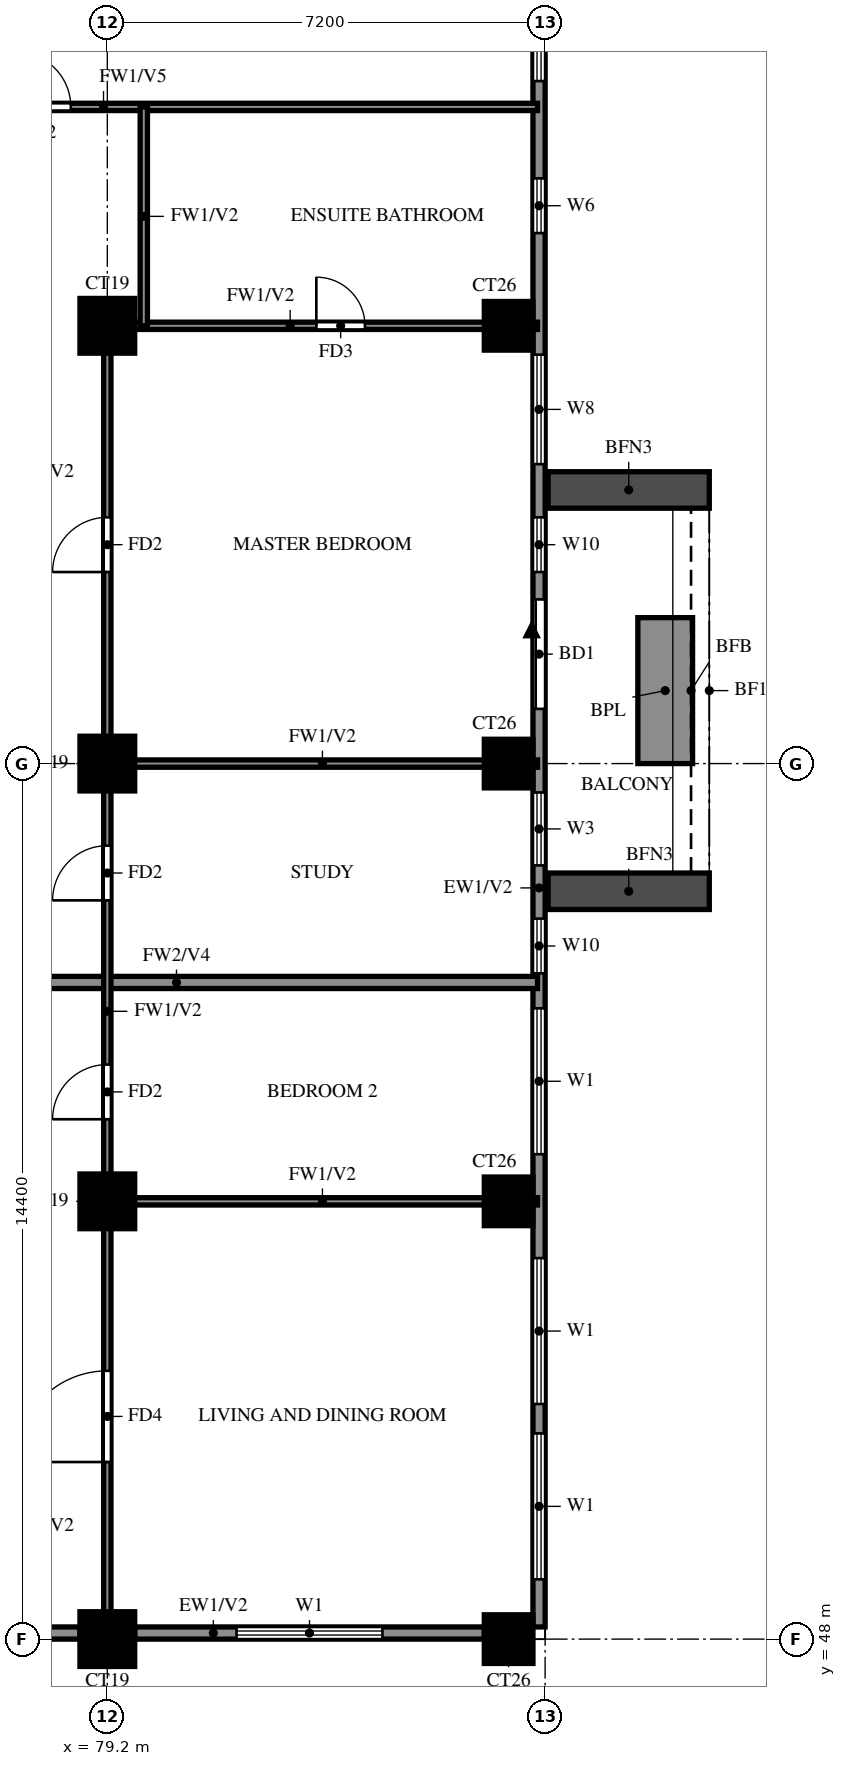
"""IFC4 building model, lengths in metres.
Left out: names, types, materials, properties, quantities, classifications, styles, units other than length and angle.
Written with IfcOpenShell. Run it as: python <this file> out.ifc"""

import sys

from ifc_helpers import new_model, si_unit, direction, frame, frame_2d, origin, origin_2d, place, context, subcontext, project, spatial, rectangle, extrude, source, transform, mapped, element, fill, save


model = new_model("IFC4")
c1 = context("Model", 3, precision=1e-05, world=origin(), true_north=direction((0.0, 1.0)))
c2 = subcontext(c1, "Body", "Model", "MODEL_VIEW")
j1 = project(units=[si_unit("LENGTHUNIT", "METRE"), si_unit("PLANEANGLEUNIT", "RADIAN")], contexts=[c1])
p1 = place(None, origin())
s1 = spatial("IfcSite", under=j1, at=p1, CompositionType="ELEMENT")
p2 = place(p1, origin())
s2 = spatial("IfcBuilding", under=s1, at=p2, CompositionType="ELEMENT")
p3 = place(p2, frame((0.0, 0.0, 174.5)))
s3 = spatial("IfcBuildingStorey", under=s2, at=p3, CompositionType="ELEMENT", Elevation=174.5)
m1 = source(origin(), c2, "Body", "SweptSolid", [
    extrude(rectangle(XDim=0.9, YDim=0.9, at=origin_2d()), origin(), (0.0, 0.0, 1.0), 3.2),
])
p4 = place(p3, frame((79.2, 48.0, 0.0), z_axis=(0.0, 0.0, 1.0), x_axis=(1.0, 0.0, 0.0)))
e1 = element("IfcColumn", 1, at=p4, inside=s3, PredefinedType="COLUMN", context=c2, shape_type="MappedRepresentation", body=[
    mapped(m1, transform((0.0, 0.0, 0.0))),
])
m2 = source(origin(), c2, "Body", "SweptSolid", [
    extrude(rectangle(XDim=0.8, YDim=0.8, at=origin_2d()), origin(), (0.0, 0.0, 1.0), 3.2),
])
p5 = place(p3, frame((85.8, 48.0, 0.0), z_axis=(0.0, 0.0, 1.0), x_axis=(1.0, 0.0, 0.0)))
e2 = element("IfcColumn", 2, at=p5, inside=s3, PredefinedType="COLUMN", context=c2, shape_type="MappedRepresentation", body=[
    mapped(m2, transform((0.0, 0.0, 0.0))),
])
p6 = place(p3, frame((79.2, 55.2, 0.0), z_axis=(0.0, 0.0, 1.0), x_axis=(1.0, 0.0, 0.0)))
e3 = element("IfcColumn", 3, at=p6, inside=s3, PredefinedType="COLUMN", context=c2, shape_type="MappedRepresentation", body=[
    mapped(m1, transform((0.0, 0.0, 0.0))),
])
p7 = place(p3, frame((85.8, 55.2, 0.0), z_axis=(0.0, 0.0, 1.0), x_axis=(1.0, 0.0, 0.0)))
e4 = element("IfcColumn", 4, at=p7, inside=s3, PredefinedType="COLUMN", context=c2, shape_type="MappedRepresentation", body=[
    mapped(m2, transform((0.0, 0.0, 0.0))),
])
p8 = place(p3, frame((79.2, 62.4, 0.0), z_axis=(0.0, 0.0, 1.0), x_axis=(1.0, 0.0, 0.0)))
e5 = element("IfcColumn", 5, at=p8, inside=s3, PredefinedType="COLUMN", context=c2, shape_type="MappedRepresentation", body=[
    mapped(m1, transform((0.0, 0.0, 0.0))),
])
p9 = place(p3, frame((85.8, 62.4, 0.0), z_axis=(0.0, 0.0, 1.0), x_axis=(1.0, 0.0, 0.0)))
e6 = element("IfcColumn", 6, at=p9, inside=s3, PredefinedType="COLUMN", context=c2, shape_type="MappedRepresentation", body=[
    mapped(m2, transform((0.0, 0.0, 0.0))),
])
p10 = place(p3, frame((79.2, 69.6, 0.0), z_axis=(0.0, 0.0, 1.0), x_axis=(1.0, 0.0, 0.0)))
e7 = element("IfcColumn", 7, at=p10, inside=s3, PredefinedType="COLUMN", context=c2, shape_type="MappedRepresentation", body=[
    mapped(m1, transform((0.0, 0.0, 0.0))),
])
p11 = place(p3, frame((85.8, 69.6, 0.0), z_axis=(0.0, 0.0, 1.0), x_axis=(1.0, 0.0, 0.0)))
e8 = element("IfcColumn", 8, at=p11, inside=s3, PredefinedType="COLUMN", context=c2, shape_type="MappedRepresentation", body=[
    mapped(m2, transform((0.0, 0.0, 0.0))),
])
p12 = place(p3, frame((85.719, 39.881, 0.0), z_axis=(0.0, 0.0, 1.0), x_axis=(-0.86377618652, 0.503875678716, 0.0)))
e9 = element("IfcWall", 9, at=p12, inside=s3, PredefinedType="SOLIDWALL", context=c2, shape_type="SweptSolid", body=[
    extrude(rectangle(XDim=16.311, YDim=0.2, at=frame_2d((8.156, 0.0))), origin(), (0.0, 0.0, 1.0), 3.2),
])
p13 = place(p12, frame((13.326, 0.0, 1.5)))
e10 = element("IfcOpeningElement", 10, at=p13, cuts=e9, PredefinedType="OPENING", context=c2, shape_type="SweptSolid", body=[
    extrude(rectangle(XDim=0.9, YDim=0.9, at=frame_2d((0.45, 0.45))), frame((0.0, 0.11, 0.0), z_axis=(0.0, -1.0, 0.0), x_axis=(1.0, 0.0, 0.0)), (0.0, 0.0, 1.0), 0.22),
])
p14 = place(p3, frame((71.99, 48.1, 0.0), z_axis=(0.0, 0.0, 1.0), x_axis=(1.0, 0.0, 0.0)))
e11 = element("IfcWall", 11, at=p14, inside=s3, PredefinedType="SOLIDWALL", context=c2, shape_type="SweptSolid", body=[
    extrude(rectangle(XDim=6.76, YDim=0.2, at=frame_2d((3.38, 0.0))), origin(), (0.0, 0.0, 1.0), 3.2),
])
p15 = place(p14, frame((2.205, 0.0, 1.5)))
e12 = element("IfcOpeningElement", 12, at=p15, cuts=e11, PredefinedType="OPENING", context=c2, shape_type="SweptSolid", body=[
    extrude(rectangle(XDim=0.9, YDim=0.9, at=frame_2d((0.45, 0.45))), frame((0.0, 0.11, 0.0), z_axis=(0.0, -1.0, 0.0), x_axis=(1.0, 0.0, 0.0)), (0.0, 0.0, 1.0), 0.22),
])
p16 = place(p3, frame((79.65, 48.1, 0.0), z_axis=(0.0, 0.0, 1.0), x_axis=(1.0, 0.0, 0.0)))
e13 = element("IfcWall", 13, at=p16, inside=s3, PredefinedType="SOLIDWALL", context=c2, shape_type="SweptSolid", body=[
    extrude(rectangle(XDim=5.75, YDim=0.2, at=frame_2d((2.875, 0.0))), origin(), (0.0, 0.0, 1.0), 3.2),
])
p17 = place(p16, frame((1.675, 0.0, 0.6)))
e14 = element("IfcOpeningElement", 14, at=p17, cuts=e13, PredefinedType="OPENING", context=c2, shape_type="SweptSolid", body=[
    extrude(rectangle(XDim=2.4, YDim=2.4, at=frame_2d((1.2, 1.2))), frame((0.0, 0.11, 0.0), z_axis=(0.0, -1.0, 0.0), x_axis=(1.0, 0.0, 0.0)), (0.0, 0.0, 1.0), 0.22),
])
p18 = place(p3, frame((86.3, 48.2, 0.0), z_axis=(0.0, 0.0, 1.0), x_axis=(0.0, 1.0, 0.0)))
e15 = element("IfcWall", 15, at=p18, inside=s3, PredefinedType="SOLIDWALL", context=c2, shape_type="SweptSolid", body=[
    extrude(rectangle(XDim=28.6, YDim=0.2, at=frame_2d((14.3, 0.0))), origin(), (0.0, 0.0, 1.0), 3.2),
])
p19 = place(p18, frame((15.1, 0.0, 0.0)))
e16 = element("IfcOpeningElement", 16, at=p19, cuts=e15, PredefinedType="OPENING", context=c2, shape_type="SweptSolid", body=[
    extrude(rectangle(XDim=1.8, YDim=2.4, at=frame_2d((0.9, 1.2))), frame((0.0, 0.11, 0.0), z_axis=(0.0, -1.0, 0.0), x_axis=(1.0, 0.0, 0.0)), (0.0, 0.0, 1.0), 0.22),
])
p20 = place(p18, frame((0.783, 0.0, 0.6)))
e17 = element("IfcOpeningElement", 17, at=p20, cuts=e15, PredefinedType="OPENING", context=c2, shape_type="SweptSolid", body=[
    extrude(rectangle(XDim=2.4, YDim=2.4, at=frame_2d((1.2, 1.2))), frame((0.0, 0.11, 0.0), z_axis=(0.0, -1.0, 0.0), x_axis=(1.0, 0.0, 0.0)), (0.0, 0.0, 1.0), 0.22),
])
p21 = place(p18, frame((3.667, 0.0, 0.6)))
e18 = element("IfcOpeningElement", 18, at=p21, cuts=e15, PredefinedType="OPENING", context=c2, shape_type="SweptSolid", body=[
    extrude(rectangle(XDim=2.4, YDim=2.4, at=frame_2d((1.2, 1.2))), frame((0.0, 0.11, 0.0), z_axis=(0.0, -1.0, 0.0), x_axis=(1.0, 0.0, 0.0)), (0.0, 0.0, 1.0), 0.22),
])
p22 = place(p18, frame((7.775, 0.0, 0.6)))
e19 = element("IfcOpeningElement", 19, at=p22, cuts=e15, PredefinedType="OPENING", context=c2, shape_type="SweptSolid", body=[
    extrude(rectangle(XDim=2.4, YDim=2.4, at=frame_2d((1.2, 1.2))), frame((0.0, 0.11, 0.0), z_axis=(0.0, -1.0, 0.0), x_axis=(1.0, 0.0, 0.0)), (0.0, 0.0, 1.0), 0.22),
])
p23 = place(p18, frame((10.75, 0.0, 0.6)))
e20 = element("IfcOpeningElement", 20, at=p23, cuts=e15, PredefinedType="OPENING", context=c2, shape_type="SweptSolid", body=[
    extrude(rectangle(XDim=0.9, YDim=2.4, at=frame_2d((0.45, 1.2))), frame((0.0, 0.11, 0.0), z_axis=(0.0, -1.0, 0.0), x_axis=(1.0, 0.0, 0.0)), (0.0, 0.0, 1.0), 0.22),
])
p24 = place(p18, frame((12.525, 0.0, 0.6)))
e21 = element("IfcOpeningElement", 21, at=p24, cuts=e15, PredefinedType="OPENING", context=c2, shape_type="SweptSolid", body=[
    extrude(rectangle(XDim=1.2, YDim=2.4, at=frame_2d((0.6, 1.2))), frame((0.0, 0.11, 0.0), z_axis=(0.0, -1.0, 0.0), x_axis=(1.0, 0.0, 0.0)), (0.0, 0.0, 1.0), 0.22),
])
p25 = place(p18, frame((17.35, 0.0, 0.6)))
e22 = element("IfcOpeningElement", 22, at=p25, cuts=e15, PredefinedType="OPENING", context=c2, shape_type="SweptSolid", body=[
    extrude(rectangle(XDim=0.9, YDim=2.4, at=frame_2d((0.45, 1.2))), frame((0.0, 0.11, 0.0), z_axis=(0.0, -1.0, 0.0), x_axis=(1.0, 0.0, 0.0)), (0.0, 0.0, 1.0), 0.22),
])
p26 = place(p18, frame((19.125, 0.0, 0.6)))
e23 = element("IfcOpeningElement", 23, at=p26, cuts=e15, PredefinedType="OPENING", context=c2, shape_type="SweptSolid", body=[
    extrude(rectangle(XDim=1.8, YDim=2.4, at=frame_2d((0.9, 1.2))), frame((0.0, 0.11, 0.0), z_axis=(0.0, -1.0, 0.0), x_axis=(1.0, 0.0, 0.0)), (0.0, 0.0, 1.0), 0.22),
])
p27 = place(p18, frame((22.925, 0.0, 1.5)))
e24 = element("IfcOpeningElement", 24, at=p27, cuts=e15, PredefinedType="OPENING", context=c2, shape_type="SweptSolid", body=[
    extrude(rectangle(XDim=0.9, YDim=0.9, at=frame_2d((0.45, 0.45))), frame((0.0, 0.11, 0.0), z_axis=(0.0, -1.0, 0.0), x_axis=(1.0, 0.0, 0.0)), (0.0, 0.0, 1.0), 0.22),
])
p28 = place(p18, frame((25.425, 0.0, 0.6)))
e25 = element("IfcOpeningElement", 25, at=p28, cuts=e15, PredefinedType="OPENING", context=c2, shape_type="SweptSolid", body=[
    extrude(rectangle(XDim=2.4, YDim=2.4, at=frame_2d((1.2, 1.2))), frame((0.0, 0.11, 0.0), z_axis=(0.0, -1.0, 0.0), x_axis=(1.0, 0.0, 0.0)), (0.0, 0.0, 1.0), 0.22),
])
for number, where, z_axis, x_axis in (
    (26, (86.45, 60.3, 0.0), (0.0, 0.0, 1.0), (1.0, 0.0, 0.0)),
    (27, (86.45, 66.9, 0.0), (0.0, 0.0, 1.0), (1.0, 0.0, 0.0)),
):
    element("IfcWall", number, at=place(p3, frame(where, z_axis=z_axis, x_axis=x_axis)), inside=s3, PredefinedType="SOLIDWALL", context=c2, shape_type="SweptSolid", body=[
        extrude(rectangle(XDim=2.65, YDim=0.6, at=frame_2d((1.325, 0.0))), origin(), (0.0, 0.0, 1.0), 2.85),
    ])
p29 = place(p3, frame((88.375, 62.4, 0.0), z_axis=(0.0, 0.0, 1.0), x_axis=(0.0, 1.0, 0.0)))
e28 = element("IfcWall", 28, at=p29, inside=s3, PredefinedType="SOLIDWALL", context=c2, shape_type="SweptSolid", body=[
    extrude(rectangle(XDim=2.4, YDim=0.9, at=frame_2d((1.2, 0.0))), origin(), (0.0, 0.0, 1.0), 0.9),
])
p30 = place(p3, frame((74.4, 58.8, 0.0), z_axis=(0.0, 0.0, 1.0), x_axis=(1.0, 0.0, 0.0)))
e29 = element("IfcWall", 29, at=p30, inside=s3, PredefinedType="SOLIDWALL", context=c2, shape_type="SweptSolid", body=[
    extrude(rectangle(XDim=11.875, YDim=0.2, at=frame_2d((5.938, 0.0))), origin(), (0.0, 0.0, 1.0), 2.3),
])
for number, where, z_axis, x_axis in (
    (30, (79.2, 55.2, 0.0), (0.0, 0.0, 1.0), (1.0, 0.0, 0.0)),
    (31, (79.2, 62.4, 0.0), (0.0, 0.0, 1.0), (1.0, 0.0, 0.0)),
):
    element("IfcWall", number, at=place(p3, frame(where, z_axis=z_axis, x_axis=x_axis)), inside=s3, PredefinedType="PARTITIONING", context=c2, shape_type="SweptSolid", body=[
        extrude(rectangle(XDim=7.075, YDim=0.12, at=frame_2d((3.538, 0.0))), origin(), (0.0, 0.0, 1.0), 3.2),
    ])
p31 = place(p3, frame((79.2, 69.6, 0.0), z_axis=(0.0, 0.0, 1.0), x_axis=(1.0, 0.0, 0.0)))
e32 = element("IfcWall", 32, at=p31, inside=s3, PredefinedType="PARTITIONING", context=c2, shape_type="SweptSolid", body=[
    extrude(rectangle(XDim=7.075, YDim=0.12, at=frame_2d((3.538, 0.0))), origin(), (0.0, 0.0, 1.0), 3.2),
])
p32 = place(p31, frame((3.438, 0.0, 0.0)))
e33 = element("IfcOpeningElement", 33, at=p32, cuts=e32, PredefinedType="OPENING", context=c2, shape_type="SweptSolid", body=[
    extrude(rectangle(XDim=0.8, YDim=2.1, at=frame_2d((0.4, 1.05))), frame((0.0, 0.07, 0.0), z_axis=(0.0, -1.0, 0.0), x_axis=(1.0, 0.0, 0.0)), (0.0, 0.0, 1.0), 0.14),
])
p33 = place(p3, frame((72.0, 73.2, 0.0), z_axis=(0.0, 0.0, 1.0), x_axis=(1.0, 0.0, 0.0)))
e34 = element("IfcWall", 34, at=p33, inside=s3, PredefinedType="PARTITIONING", context=c2, shape_type="SweptSolid", body=[
    extrude(rectangle(XDim=14.275, YDim=0.12, at=frame_2d((7.137, 0.0))), origin(), (0.0, 0.0, 1.0), 2.3),
])
p34 = place(p33, frame((5.7, 0.0, 0.0)))
e35 = element("IfcOpeningElement", 35, at=p34, cuts=e34, PredefinedType="OPENING", context=c2, shape_type="SweptSolid", body=[
    extrude(rectangle(XDim=0.9, YDim=2.1, at=frame_2d((0.45, 1.05))), frame((0.0, 0.07, 0.0), z_axis=(0.0, -1.0, 0.0), x_axis=(1.0, 0.0, 0.0)), (0.0, 0.0, 1.0), 0.14),
])
p35 = place(p3, frame((79.2, 48.125, 0.0), z_axis=(0.0, 0.0, 1.0), x_axis=(0.0, 1.0, 0.0)))
e36 = element("IfcWall", 36, at=p35, inside=s3, PredefinedType="PARTITIONING", context=c2, shape_type="SweptSolid", body=[
    extrude(rectangle(XDim=21.475, YDim=0.12, at=frame_2d((10.738, 0.0))), origin(), (0.0, 0.0, 1.0), 3.2),
])
p36 = place(p35, frame((2.788, 0.0, 0.0)))
e37 = element("IfcOpeningElement", 37, at=p36, cuts=e36, PredefinedType="OPENING", context=c2, shape_type="SweptSolid", body=[
    extrude(rectangle(XDim=1.5, YDim=2.1, at=frame_2d((0.75, 1.05))), frame((0.0, 0.07, 0.0), z_axis=(0.0, -1.0, 0.0), x_axis=(1.0, 0.0, 0.0)), (0.0, 0.0, 1.0), 0.14),
])
p37 = place(p35, frame((8.425, 0.0, 0.0)))
e38 = element("IfcOpeningElement", 38, at=p37, cuts=e36, PredefinedType="OPENING", context=c2, shape_type="SweptSolid", body=[
    extrude(rectangle(XDim=0.9, YDim=2.1, at=frame_2d((0.45, 1.05))), frame((0.0, 0.07, 0.0), z_axis=(0.0, -1.0, 0.0), x_axis=(1.0, 0.0, 0.0)), (0.0, 0.0, 1.0), 0.14),
])
p38 = place(p35, frame((12.025, 0.0, 0.0)))
e39 = element("IfcOpeningElement", 39, at=p38, cuts=e36, PredefinedType="OPENING", context=c2, shape_type="SweptSolid", body=[
    extrude(rectangle(XDim=0.9, YDim=2.1, at=frame_2d((0.45, 1.05))), frame((0.0, 0.07, 0.0), z_axis=(0.0, -1.0, 0.0), x_axis=(1.0, 0.0, 0.0)), (0.0, 0.0, 1.0), 0.14),
])
p39 = place(p35, frame((17.425, 0.0, 0.0)))
e40 = element("IfcOpeningElement", 40, at=p39, cuts=e36, PredefinedType="OPENING", context=c2, shape_type="SweptSolid", body=[
    extrude(rectangle(XDim=0.9, YDim=2.1, at=frame_2d((0.45, 1.05))), frame((0.0, 0.07, 0.0), z_axis=(0.0, -1.0, 0.0), x_axis=(1.0, 0.0, 0.0)), (0.0, 0.0, 1.0), 0.14),
])
p40 = place(p3, frame((79.8, 69.6, 0.0), z_axis=(0.0, 0.0, 1.0), x_axis=(0.0, 1.0, 0.0)))
e41 = element("IfcWall", 41, at=p40, inside=s3, PredefinedType="PARTITIONING", context=c2, shape_type="SweptSolid", body=[
    extrude(rectangle(XDim=3.6, YDim=0.12, at=frame_2d((1.8, 0.0))), origin(), (0.0, 0.0, 1.0), 3.2),
])
p41 = place(p17, origin())
e42 = element("IfcWindow", 42, at=p41, inside=s3, PartitioningType="DOUBLE_PANEL_VERTICAL", PredefinedType="WINDOW", context=c2, shape_type="SweptSolid", body=[
    extrude(rectangle(XDim=2.4, YDim=2.4, at=frame_2d((1.2, 1.2))), frame((0.0, 0.03, 0.0), z_axis=(0.0, -1.0, 0.0), x_axis=(1.0, 0.0, 0.0)), (0.0, 0.0, 1.0), 0.06),
])
fill(e14, e42)
p42 = place(p19, origin())
e43 = element("IfcDoor", 43, at=p42, inside=s3, OperationType="DOUBLE_DOOR_SLIDING", PredefinedType="DOOR", context=c2, shape_type="SweptSolid", body=[
    extrude(rectangle(XDim=1.8, YDim=2.4, at=frame_2d((0.9, 1.2))), frame((0.0, 0.025, 0.0), z_axis=(0.0, -1.0, 0.0), x_axis=(1.0, 0.0, 0.0)), (0.0, 0.0, 1.0), 0.05),
])
fill(e16, e43)
p43 = place(p20, origin())
e44 = element("IfcWindow", 44, at=p43, inside=s3, PartitioningType="DOUBLE_PANEL_VERTICAL", PredefinedType="WINDOW", context=c2, shape_type="SweptSolid", body=[
    extrude(rectangle(XDim=2.4, YDim=2.4, at=frame_2d((1.2, 1.2))), frame((0.0, 0.03, 0.0), z_axis=(0.0, -1.0, 0.0), x_axis=(1.0, 0.0, 0.0)), (0.0, 0.0, 1.0), 0.06),
])
fill(e17, e44)
p44 = place(p21, origin())
e45 = element("IfcWindow", 45, at=p44, inside=s3, PartitioningType="DOUBLE_PANEL_VERTICAL", PredefinedType="WINDOW", context=c2, shape_type="SweptSolid", body=[
    extrude(rectangle(XDim=2.4, YDim=2.4, at=frame_2d((1.2, 1.2))), frame((0.0, 0.03, 0.0), z_axis=(0.0, -1.0, 0.0), x_axis=(1.0, 0.0, 0.0)), (0.0, 0.0, 1.0), 0.06),
])
fill(e18, e45)
p45 = place(p22, origin())
e46 = element("IfcWindow", 46, at=p45, inside=s3, PartitioningType="DOUBLE_PANEL_VERTICAL", PredefinedType="WINDOW", context=c2, shape_type="SweptSolid", body=[
    extrude(rectangle(XDim=2.4, YDim=2.4, at=frame_2d((1.2, 1.2))), frame((0.0, 0.03, 0.0), z_axis=(0.0, -1.0, 0.0), x_axis=(1.0, 0.0, 0.0)), (0.0, 0.0, 1.0), 0.06),
])
fill(e19, e46)
p46 = place(p23, origin())
e47 = element("IfcWindow", 47, at=p46, inside=s3, PartitioningType="SINGLE_PANEL", PredefinedType="WINDOW", context=c2, shape_type="SweptSolid", body=[
    extrude(rectangle(XDim=0.9, YDim=2.4, at=frame_2d((0.45, 1.2))), frame((0.0, 0.03, 0.0), z_axis=(0.0, -1.0, 0.0), x_axis=(1.0, 0.0, 0.0)), (0.0, 0.0, 1.0), 0.06),
])
fill(e20, e47)
p47 = place(p24, origin())
e48 = element("IfcWindow", 48, at=p47, inside=s3, PartitioningType="SINGLE_PANEL", PredefinedType="WINDOW", context=c2, shape_type="SweptSolid", body=[
    extrude(rectangle(XDim=1.2, YDim=2.4, at=frame_2d((0.6, 1.2))), frame((0.0, 0.03, 0.0), z_axis=(0.0, -1.0, 0.0), x_axis=(1.0, 0.0, 0.0)), (0.0, 0.0, 1.0), 0.06),
])
fill(e21, e48)
p48 = place(p25, origin())
e49 = element("IfcWindow", 49, at=p48, inside=s3, PartitioningType="SINGLE_PANEL", PredefinedType="WINDOW", context=c2, shape_type="SweptSolid", body=[
    extrude(rectangle(XDim=0.9, YDim=2.4, at=frame_2d((0.45, 1.2))), frame((0.0, 0.03, 0.0), z_axis=(0.0, -1.0, 0.0), x_axis=(1.0, 0.0, 0.0)), (0.0, 0.0, 1.0), 0.06),
])
fill(e22, e49)
p49 = place(p26, origin())
e50 = element("IfcWindow", 50, at=p49, inside=s3, PartitioningType="DOUBLE_PANEL_VERTICAL", PredefinedType="WINDOW", context=c2, shape_type="SweptSolid", body=[
    extrude(rectangle(XDim=1.8, YDim=2.4, at=frame_2d((0.9, 1.2))), frame((0.0, 0.03, 0.0), z_axis=(0.0, -1.0, 0.0), x_axis=(1.0, 0.0, 0.0)), (0.0, 0.0, 1.0), 0.06),
])
fill(e23, e50)
p50 = place(p27, origin())
e51 = element("IfcWindow", 51, at=p50, inside=s3, PartitioningType="SINGLE_PANEL", PredefinedType="WINDOW", context=c2, shape_type="SweptSolid", body=[
    extrude(rectangle(XDim=0.9, YDim=0.9, at=frame_2d((0.45, 0.45))), frame((0.0, 0.03, 0.0), z_axis=(0.0, -1.0, 0.0), x_axis=(1.0, 0.0, 0.0)), (0.0, 0.0, 1.0), 0.06),
])
fill(e24, e51)
p51 = place(p28, origin())
e52 = element("IfcWindow", 52, at=p51, inside=s3, PartitioningType="DOUBLE_PANEL_VERTICAL", PredefinedType="WINDOW", context=c2, shape_type="SweptSolid", body=[
    extrude(rectangle(XDim=2.4, YDim=2.4, at=frame_2d((1.2, 1.2))), frame((0.0, 0.03, 0.0), z_axis=(0.0, -1.0, 0.0), x_axis=(1.0, 0.0, 0.0)), (0.0, 0.0, 1.0), 0.06),
])
fill(e25, e52)
p52 = place(p36, origin())
e53 = element("IfcDoor", 53, at=p52, inside=s3, OperationType="SINGLE_SWING_RIGHT", PredefinedType="DOOR", context=c2, shape_type="SweptSolid", body=[
    extrude(rectangle(XDim=1.5, YDim=2.1, at=frame_2d((0.75, 1.05))), frame((0.0, 0.025, 0.0), z_axis=(0.0, -1.0, 0.0), x_axis=(1.0, 0.0, 0.0)), (0.0, 0.0, 1.0), 0.05),
])
fill(e37, e53)
p53 = place(p37, origin())
e54 = element("IfcDoor", 54, at=p53, inside=s3, OperationType="SINGLE_SWING_LEFT", PredefinedType="DOOR", context=c2, shape_type="SweptSolid", body=[
    extrude(rectangle(XDim=0.9, YDim=2.1, at=frame_2d((0.45, 1.05))), frame((0.0, 0.025, 0.0), z_axis=(0.0, -1.0, 0.0), x_axis=(1.0, 0.0, 0.0)), (0.0, 0.0, 1.0), 0.05),
])
fill(e38, e54)
p54 = place(p38, origin())
e55 = element("IfcDoor", 55, at=p54, inside=s3, OperationType="SINGLE_SWING_LEFT", PredefinedType="DOOR", context=c2, shape_type="SweptSolid", body=[
    extrude(rectangle(XDim=0.9, YDim=2.1, at=frame_2d((0.45, 1.05))), frame((0.0, 0.025, 0.0), z_axis=(0.0, -1.0, 0.0), x_axis=(1.0, 0.0, 0.0)), (0.0, 0.0, 1.0), 0.05),
])
fill(e39, e55)
p55 = place(p39, origin())
e56 = element("IfcDoor", 56, at=p55, inside=s3, OperationType="SINGLE_SWING_RIGHT", PredefinedType="DOOR", context=c2, shape_type="SweptSolid", body=[
    extrude(rectangle(XDim=0.9, YDim=2.1, at=frame_2d((0.45, 1.05))), frame((0.0, 0.025, 0.0), z_axis=(0.0, -1.0, 0.0), x_axis=(1.0, 0.0, 0.0)), (0.0, 0.0, 1.0), 0.05),
])
fill(e40, e56)
p56 = place(p32, origin())
e57 = element("IfcDoor", 57, at=p56, inside=s3, OperationType="SINGLE_SWING_LEFT", PredefinedType="DOOR", context=c2, shape_type="SweptSolid", body=[
    extrude(rectangle(XDim=0.8, YDim=2.1, at=frame_2d((0.4, 1.05))), frame((0.0, 0.025, 0.0), z_axis=(0.0, -1.0, 0.0), x_axis=(1.0, 0.0, 0.0)), (0.0, 0.0, 1.0), 0.05),
])
fill(e33, e57)
p57 = place(p34, origin())
e58 = element("IfcDoor", 58, at=p57, inside=s3, OperationType="SINGLE_SWING_LEFT", PredefinedType="DOOR", context=c2, shape_type="SweptSolid", body=[
    extrude(rectangle(XDim=0.9, YDim=2.1, at=frame_2d((0.45, 1.05))), frame((0.0, 0.025, 0.0), z_axis=(0.0, -1.0, 0.0), x_axis=(1.0, 0.0, 0.0)), (0.0, 0.0, 1.0), 0.05),
])
fill(e35, e58)
save(model, sys.argv[1])
